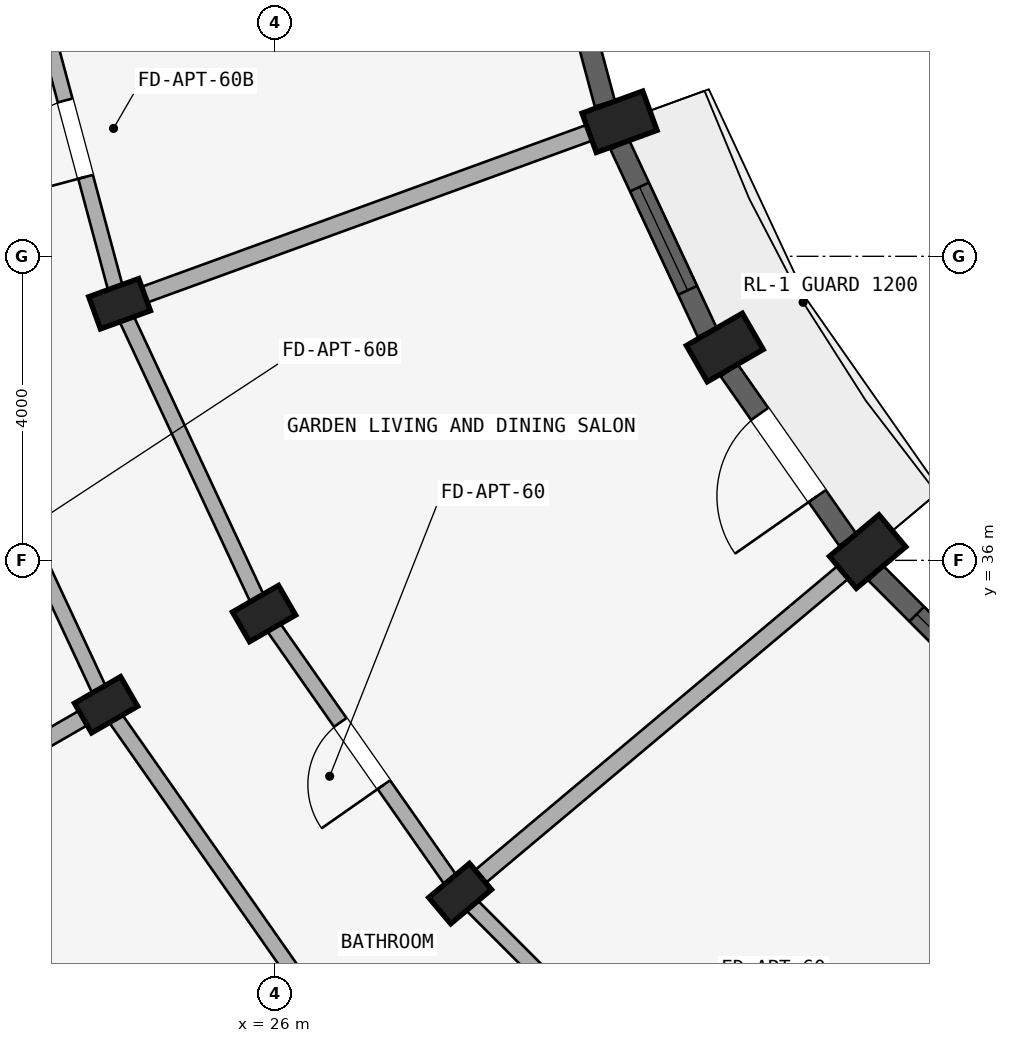
"""IFC4 building model, lengths in metres.
Left out: names, types, materials, properties, quantities, classifications, styles, units other than length and angle.
Written with IfcOpenShell. Run it as: python <this file> out.ifc"""

import sys

from ifc_helpers import new_model, si_unit, direction, frame, frame_2d, origin, origin_2d, place, context, subcontext, project, spatial, rectangle, extrude, element, fill, save


model = new_model("IFC4")
c1 = context("Model", 3, precision=1e-05, world=origin(), true_north=direction((0.0, 1.0)))
c2 = subcontext(c1, "Body", "Model", "MODEL_VIEW")
j1 = project(units=[si_unit("LENGTHUNIT", "METRE"), si_unit("PLANEANGLEUNIT", "RADIAN")], contexts=[c1])
p1 = place(None, origin())
s1 = spatial("IfcSite", under=j1, at=p1, CompositionType="ELEMENT")
p2 = place(p1, origin())
s2 = spatial("IfcBuilding", under=s1, at=p2, CompositionType="ELEMENT")
p3 = place(p2, frame((0.0, 0.0, 15.0)))
s3 = spatial("IfcBuildingStorey", under=s2, at=p3, CompositionType="ELEMENT", Elevation=15.0)
p4 = place(p3, frame((33.798, 36.115, 0.0), z_axis=(0.0, 0.0, 1.0), x_axis=(-0.642787609687, 0.766044443119, 0.0)))
e1 = element("IfcColumn", 1, at=p4, inside=s3, PredefinedType="COLUMN", context=c2, shape_type="SweptSolid", body=[
    extrude(rectangle(XDim=0.55, YDim=0.85, at=origin_2d()), origin(), (0.0, 0.0, 1.0), 2.93),
])
p5 = place(p3, frame((28.436, 31.616, 0.0), z_axis=(0.0, 0.0, 1.0), x_axis=(-0.642787609687, 0.766044443119, 0.0)))
e2 = element("IfcColumn", 2, at=p5, inside=s3, PredefinedType="COLUMN", context=c2, shape_type="SweptSolid", body=[
    extrude(rectangle(XDim=0.45, YDim=0.7, at=origin_2d()), origin(), (0.0, 0.0, 1.0), 2.93),
])
p6 = place(p3, frame((31.919, 38.8, 0.0), z_axis=(0.0, 0.0, 1.0), x_axis=(-0.5, 0.866025403784, 0.0)))
e3 = element("IfcColumn", 3, at=p6, inside=s3, PredefinedType="COLUMN", context=c2, shape_type="SweptSolid", body=[
    extrude(rectangle(XDim=0.55, YDim=0.85, at=origin_2d()), origin(), (0.0, 0.0, 1.0), 2.93),
])
for number, where, z_axis, x_axis in (
    (4, (25.856, 35.3, 0.0), (0.0, 0.0, 1.0), (-0.5, 0.866, 0.0)),
    (5, (23.778, 34.1, 0.0), (0.0, 0.0, 1.0), (-0.5, 0.866, 0.0)),
):
    element("IfcColumn", number, at=place(p3, frame(where, z_axis=z_axis, x_axis=x_axis)), inside=s3, PredefinedType="COLUMN", context=c2, shape_type="SweptSolid", body=[
        extrude(rectangle(XDim=0.45, YDim=0.7, at=origin_2d()), origin(), (0.0, 0.0, 1.0), 2.93),
    ])
p7 = place(p3, frame((30.534, 41.77, 0.0), z_axis=(0.0, 0.0, 1.0), x_axis=(-0.342020143326, 0.939692620786, 0.0)))
e6 = element("IfcColumn", 6, at=p7, inside=s3, PredefinedType="COLUMN", context=c2, shape_type="SweptSolid", body=[
    extrude(rectangle(XDim=0.55, YDim=0.85, at=origin_2d()), origin(), (0.0, 0.0, 1.0), 2.93),
])
p8 = place(p3, frame((23.956, 39.376, 0.0), z_axis=(0.0, 0.0, 1.0), x_axis=(-0.342020143326, 0.939692620786, 0.0)))
e7 = element("IfcColumn", 7, at=p8, inside=s3, PredefinedType="COLUMN", context=c2, shape_type="SweptSolid", body=[
    extrude(rectangle(XDim=0.45, YDim=0.7, at=origin_2d()), origin(), (0.0, 0.0, 1.0), 2.93),
])
p9 = place(p3, frame((31.616, 28.436, 0.0), z_axis=(0.0, 0.0, 1.0), x_axis=(-0.707106781187, 0.707106781187, 0.0)))
e8 = element("IfcWall", 8, at=p9, inside=s3, PredefinedType="STANDARD", context=c2, shape_type="SweptSolid", body=[
    extrude(rectangle(XDim=4.497, YDim=0.2, at=frame_2d((2.249, 0.0))), origin(), (0.0, 0.0, 1.0), 2.372),
])
p10 = place(p3, frame((28.436, 31.616, 0.0), z_axis=(0.0, 0.0, 1.0), x_axis=(-0.573571637217, 0.819155404658, 0.0)))
e9 = element("IfcWall", 9, at=p10, inside=s3, PredefinedType="STANDARD", context=c2, shape_type="SweptSolid", body=[
    extrude(rectangle(XDim=4.497, YDim=0.2, at=frame_2d((2.249, 0.0))), origin(), (0.0, 0.0, 1.0), 2.372),
])
p11 = place(p10, frame((1.749, 0.0, 0.0)))
e10 = element("IfcOpeningElement", 10, at=p11, cuts=e9, PredefinedType="OPENING", context=c2, shape_type="SweptSolid", body=[
    extrude(rectangle(XDim=1.0, YDim=2.15, at=frame_2d((0.5, 1.075))), frame((0.0, 0.11, 0.0), z_axis=(0.0, -1.0, 0.0), x_axis=(1.0, 0.0, 0.0)), (0.0, 0.0, 1.0), 0.22),
])
p12 = place(p3, frame((26.598, 30.073, 0.0), z_axis=(0.0, 0.0, 1.0), x_axis=(-0.573592335331, 0.819140911474, 0.0)))
e11 = element("IfcWall", 11, at=p12, inside=s3, PredefinedType="STANDARD", context=c2, shape_type="SweptSolid", body=[
    extrude(rectangle(XDim=4.916, YDim=0.2, at=frame_2d((2.458, 0.0))), origin(), (0.0, 0.0, 1.0), 2.372),
])
p13 = place(p3, frame((25.856, 35.3, 0.0), z_axis=(0.0, 0.0, 1.0), x_axis=(-0.422617978463, 0.906307919131, 0.0)))
e12 = element("IfcWall", 12, at=p13, inside=s3, PredefinedType="STANDARD", context=c2, shape_type="SweptSolid", body=[
    extrude(rectangle(XDim=4.497, YDim=0.2, at=frame_2d((2.249, 0.0))), origin(), (0.0, 0.0, 1.0), 2.372),
])
p14 = place(p3, frame((23.778, 34.1, 0.0), z_axis=(0.0, 0.0, 1.0), x_axis=(-0.422629854778, 0.906302381024, 0.0)))
e13 = element("IfcWall", 13, at=p14, inside=s3, PredefinedType="STANDARD", context=c2, shape_type="SweptSolid", body=[
    extrude(rectangle(XDim=4.915, YDim=0.2, at=frame_2d((2.458, 0.0))), origin(), (0.0, 0.0, 1.0), 2.372),
])
p15 = place(p14, frame((1.938, 0.0, 0.0)))
e14 = element("IfcOpeningElement", 14, at=p15, cuts=e13, PredefinedType="OPENING", context=c2, shape_type="SweptSolid", body=[
    extrude(rectangle(XDim=1.04, YDim=2.15, at=frame_2d((0.52, 1.075))), frame((0.0, 0.11, 0.0), z_axis=(0.0, -1.0, 0.0), x_axis=(1.0, 0.0, 0.0)), (0.0, 0.0, 1.0), 0.22),
])
p16 = place(p3, frame((23.956, 39.376, 0.0), z_axis=(0.0, 0.0, 1.0), x_axis=(-0.258787642463, 0.965934240054, 0.0)))
e15 = element("IfcWall", 15, at=p16, inside=s3, PredefinedType="STANDARD", context=c2, shape_type="SweptSolid", body=[
    extrude(rectangle(XDim=4.497, YDim=0.2, at=frame_2d((2.249, 0.0))), origin(), (0.0, 0.0, 1.0), 2.372),
])
p17 = place(p16, frame((1.729, 0.0, 0.0)))
e16 = element("IfcOpeningElement", 16, at=p17, cuts=e15, PredefinedType="OPENING", context=c2, shape_type="SweptSolid", body=[
    extrude(rectangle(XDim=1.04, YDim=2.15, at=frame_2d((0.52, 1.075))), frame((0.0, 0.11, 0.0), z_axis=(0.0, -1.0, 0.0), x_axis=(1.0, 0.0, 0.0)), (0.0, 0.0, 1.0), 0.22),
])
p18 = place(p3, frame((33.645, 35.987, 0.0), z_axis=(0.0, 0.0, 1.0), x_axis=(-0.766046761698, -0.642784846501, 0.0)))
e17 = element("IfcWall", 17, at=p18, inside=s3, PredefinedType="STANDARD", context=c2, shape_type="SweptSolid", body=[
    extrude(rectangle(XDim=6.75, YDim=0.22, at=frame_2d((3.375, 0.0))), origin(), (0.0, 0.0, 1.0), 2.372),
])
p19 = place(p3, frame((23.691, 34.05, 0.0), z_axis=(0.0, 0.0, 1.0), x_axis=(-0.866026648973, -0.499997843263, 0.0)))
e18 = element("IfcWall", 18, at=p19, inside=s3, PredefinedType="STANDARD", context=c2, shape_type="SweptSolid", body=[
    extrude(rectangle(XDim=17.42, YDim=0.22, at=frame_2d((8.71, 0.0))), origin(), (0.0, 0.0, 1.0), 2.372),
])
p20 = place(p3, frame((30.346, 41.702, 0.0), z_axis=(0.0, 0.0, 1.0), x_axis=(-0.939696231917, -0.342010221662, 0.0)))
e19 = element("IfcWall", 19, at=p20, inside=s3, PredefinedType="STANDARD", context=c2, shape_type="SweptSolid", body=[
    extrude(rectangle(XDim=6.75, YDim=0.22, at=frame_2d((3.375, 0.0))), origin(), (0.0, 0.0, 1.0), 2.372),
])
p21 = place(p3, frame((24.031, 27.92, 0.0), z_axis=(0.0, 0.0, 1.0), x_axis=(-0.573569599955, 0.819156831143, 0.0)))
e20 = element("IfcWall", 20, at=p21, inside=s3, PredefinedType="PLUMBINGWALL", context=c2, shape_type="SweptSolid", body=[
    extrude(rectangle(XDim=5.5, YDim=0.15, at=frame_2d((2.75, 0.0))), origin(), (0.0, 0.0, 1.0), 2.372),
])
p22 = place(p21, frame((2.35, 0.0, 0.0)))
e21 = element("IfcOpeningElement", 21, at=p22, cuts=e20, PredefinedType="OPENING", context=c2, shape_type="SweptSolid", body=[
    extrude(rectangle(XDim=0.8, YDim=2.1, at=frame_2d((0.4, 1.05))), frame((0.0, 0.085, 0.0), z_axis=(0.0, -1.0, 0.0), x_axis=(1.0, 0.0, 0.0)), (0.0, 0.0, 1.0), 0.17),
])
p23 = place(p3, frame((35.829, 33.908, 0.0), z_axis=(0.0, 0.0, 1.0), x_axis=(-0.707106781187, 0.707106781187, 0.0)))
e22 = element("IfcWall", 22, at=p23, inside=s3, PredefinedType="STANDARD", context=c2, shape_type="SweptSolid", body=[
    extrude(rectangle(XDim=2.718, YDim=0.275, at=frame_2d((1.359, 0.0))), origin(), (0.0, 0.0, 1.0), 2.472),
])
p24 = place(p23, frame((0.759, 0.0, 0.772)))
e23 = element("IfcOpeningElement", 23, at=p24, cuts=e22, PredefinedType="OPENING", context=c2, shape_type="SweptSolid", body=[
    extrude(rectangle(XDim=1.2, YDim=1.5, at=frame_2d((0.6, 0.75))), frame((0.0, 0.147, 0.0), z_axis=(0.0, -1.0, 0.0), x_axis=(1.0, 0.0, 0.0)), (0.0, 0.0, 1.0), 0.295),
])
p25 = place(p3, frame((33.535, 36.273, 0.0), z_axis=(0.0, 0.0, 1.0), x_axis=(-0.573546755948, 0.81917282593, 0.0)))
e24 = element("IfcWall", 24, at=p25, inside=s3, PredefinedType="STANDARD", context=c2, shape_type="SweptSolid", body=[
    extrude(rectangle(XDim=2.718, YDim=0.275, at=frame_2d((1.359, 0.0))), origin(), (0.0, 0.0, 1.0), 2.472),
])
p26 = place(p25, frame((0.699, 0.0, 0.0)))
e25 = element("IfcOpeningElement", 25, at=p26, cuts=e24, PredefinedType="OPENING", context=c2, shape_type="SweptSolid", body=[
    extrude(rectangle(XDim=1.32, YDim=2.15, at=frame_2d((0.66, 1.075))), frame((0.0, 0.147, 0.0), z_axis=(0.0, -1.0, 0.0), x_axis=(1.0, 0.0, 0.0)), (0.0, 0.0, 1.0), 0.295),
])
p27 = place(p3, frame((31.687, 39.001, 0.0), z_axis=(0.0, 0.0, 1.0), x_axis=(-0.422610022166, 0.906311629168, 0.0)))
e26 = element("IfcWall", 26, at=p27, inside=s3, PredefinedType="STANDARD", context=c2, shape_type="SweptSolid", body=[
    extrude(rectangle(XDim=2.718, YDim=0.275, at=frame_2d((1.359, 0.0))), origin(), (0.0, 0.0, 1.0), 2.472),
])
p28 = place(p27, frame((0.609, 0.0, 0.622)))
e27 = element("IfcOpeningElement", 27, at=p28, cuts=e26, PredefinedType="OPENING", context=c2, shape_type="SweptSolid", body=[
    extrude(rectangle(XDim=1.5, YDim=1.65, at=frame_2d((0.75, 0.825))), frame((0.0, 0.147, 0.0), z_axis=(0.0, -1.0, 0.0), x_axis=(1.0, 0.0, 0.0)), (0.0, 0.0, 1.0), 0.295),
])
p29 = place(p3, frame((30.341, 42.008, 0.0), z_axis=(0.0, 0.0, 1.0), x_axis=(-0.258819907011, 0.965925595341, 0.0)))
e28 = element("IfcWall", 28, at=p29, inside=s3, PredefinedType="STANDARD", context=c2, shape_type="SweptSolid", body=[
    extrude(rectangle(XDim=2.718, YDim=0.275, at=frame_2d((1.359, 0.0))), origin(), (0.0, 0.0, 1.0), 2.472),
])
p30 = place(p29, frame((0.759, 0.0, 0.772)))
e29 = element("IfcOpeningElement", 29, at=p30, cuts=e28, PredefinedType="OPENING", context=c2, shape_type="SweptSolid", body=[
    extrude(rectangle(XDim=1.2, YDim=1.5, at=frame_2d((0.6, 0.75))), frame((0.0, 0.147, 0.0), z_axis=(0.0, -1.0, 0.0), x_axis=(1.0, 0.0, 0.0)), (0.0, 0.0, 1.0), 0.295),
])
p31 = place(p24, origin())
e30 = element("IfcWindow", 30, at=p31, inside=s3, PartitioningType="SINGLE_PANEL", PredefinedType="WINDOW", context=c2, shape_type="SweptSolid", body=[
    extrude(rectangle(XDim=1.2, YDim=1.5, at=frame_2d((0.6, 0.75))), frame((0.0, 0.03, 0.0), z_axis=(0.0, -1.0, 0.0), x_axis=(1.0, 0.0, 0.0)), (0.0, 0.0, 1.0), 0.06),
])
fill(e23, e30)
p32 = place(p28, origin())
e31 = element("IfcWindow", 31, at=p32, inside=s3, PartitioningType="DOUBLE_PANEL_VERTICAL", PredefinedType="WINDOW", context=c2, shape_type="SweptSolid", body=[
    extrude(rectangle(XDim=1.5, YDim=1.65, at=frame_2d((0.75, 0.825))), frame((0.0, 0.03, 0.0), z_axis=(0.0, -1.0, 0.0), x_axis=(1.0, 0.0, 0.0)), (0.0, 0.0, 1.0), 0.06),
])
fill(e27, e31)
p33 = place(p11, frame((1.0, 0.0, 0.0), z_axis=(0.0, 0.0, 1.0), x_axis=(-1.0, 0.0, 0.0)))
e32 = element("IfcDoor", 32, at=p33, inside=s3, OperationType="SINGLE_SWING_RIGHT", PredefinedType="DOOR", context=c2, shape_type="SweptSolid", body=[
    extrude(rectangle(XDim=1.0, YDim=2.15, at=frame_2d((0.5, 1.075))), frame((0.0, 0.025, 0.0), z_axis=(0.0, -1.0, 0.0), x_axis=(1.0, 0.0, 0.0)), (0.0, 0.0, 1.0), 0.05),
])
fill(e10, e32)
p34 = place(p17, origin())
e33 = element("IfcDoor", 33, at=p34, inside=s3, OperationType="SINGLE_SWING_LEFT", PredefinedType="DOOR", context=c2, shape_type="SweptSolid", body=[
    extrude(rectangle(XDim=1.04, YDim=2.15, at=frame_2d((0.52, 1.075))), frame((0.0, 0.025, 0.0), z_axis=(0.0, -1.0, 0.0), x_axis=(1.0, 0.0, 0.0)), (0.0, 0.0, 1.0), 0.05),
])
fill(e16, e33)
p35 = place(p26, frame((1.32, 0.0, 0.0), z_axis=(0.0, 0.0, 1.0), x_axis=(-1.0, 0.0, 0.0)))
e34 = element("IfcDoor", 34, at=p35, inside=s3, OperationType="SINGLE_SWING_RIGHT", PredefinedType="DOOR", context=c2, shape_type="SweptSolid", body=[
    extrude(rectangle(XDim=1.32, YDim=2.15, at=frame_2d((0.66, 1.075))), frame((0.0, 0.025, 0.0), z_axis=(0.0, -1.0, 0.0), x_axis=(1.0, 0.0, 0.0)), (0.0, 0.0, 1.0), 0.05),
])
fill(e25, e34)
save(model, sys.argv[1])
